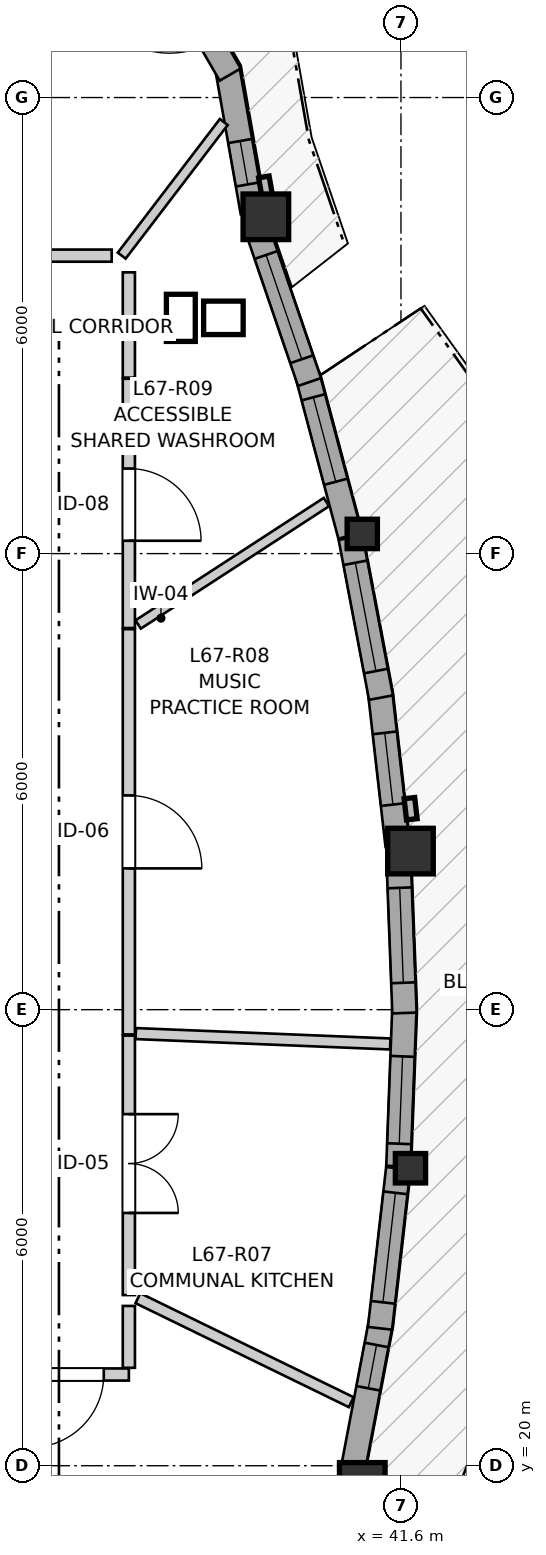
"""IFC4 building model, lengths in metres.
Left out: names, types, materials, properties, quantities, classifications, styles, units other than length and angle.
Written with IfcOpenShell. Run it as: python <this file> out.ifc"""

import sys

from ifc_helpers import new_model, si_unit, direction, frame, frame_2d, origin, origin_2d, place, context, subcontext, project, spatial, rectangle, i_section, extrude, source, transform, mapped, element, fill, save


model = new_model("IFC4")
c1 = context("Model", 3, precision=1e-05, world=origin(), true_north=direction((0.0, 1.0)))
c2 = subcontext(c1, "Body", "Model", "MODEL_VIEW")
j1 = project(units=[si_unit("LENGTHUNIT", "METRE"), si_unit("PLANEANGLEUNIT", "RADIAN")], contexts=[c1])
p1 = place(None, origin())
s1 = spatial("IfcSite", under=j1, at=p1, CompositionType="ELEMENT")
p2 = place(p1, origin())
s2 = spatial("IfcBuilding", under=s1, at=p2, CompositionType="ELEMENT")
p3 = place(p2, frame((0.0, 0.0, 224.4)))
s3 = spatial("IfcBuildingStorey", under=s2, at=p3, CompositionType="ELEMENT", Elevation=224.4)
m1 = source(origin(), c2, "Body", "SweptSolid", [
    extrude(rectangle(XDim=0.6, YDim=0.6, at=origin_2d()), origin(), (0.0, 0.0, 1.0), 2.96),
])
p4 = place(p3, frame((41.091, 19.741, 0.0), z_axis=(0.0, 0.0, 1.0), x_axis=(1.0, 0.0, 0.0)))
e1 = element("IfcColumn", 1, at=p4, inside=s3, PredefinedType="COLUMN", context=c2, shape_type="MappedRepresentation", body=[
    mapped(m1, transform((0.0, 0.0, 0.0), x_axis=(1.0, 0.0, 0.0), y_axis=(0.0, 1.0, 0.0), z_axis=(0.0, 0.0, 1.0), scale=1.0)),
])
m2 = source(origin(), c2, "Body", "SweptSolid", [
    extrude(i_section(OverallWidth=0.398, OverallDepth=0.387, WebThickness=0.019, FlangeThickness=0.03, FilletRadius=0.015, at=origin_2d()), origin(), (0.0, 0.0, 1.0), 2.96),
])
p5 = place(p3, frame((41.725, 23.914, 0.0), z_axis=(0.0, 0.0, 1.0), x_axis=(1.0, 0.0, 0.0)))
e2 = element("IfcColumn", 2, at=p5, inside=s3, PredefinedType="PILASTER", context=c2, shape_type="MappedRepresentation", body=[
    mapped(m2, transform((0.0, 0.0, 0.0), x_axis=(1.0, 0.0, 0.0), y_axis=(0.0, 1.0, 0.0), z_axis=(0.0, 0.0, 1.0), scale=1.0)),
])
p6 = place(p3, frame((41.725, 28.086, 0.0), z_axis=(0.0, 0.0, 1.0), x_axis=(1.0, 0.0, 0.0)))
e3 = element("IfcColumn", 3, at=p6, inside=s3, PredefinedType="COLUMN", context=c2, shape_type="MappedRepresentation", body=[
    mapped(m1, transform((0.0, 0.0, 0.0), x_axis=(1.0, 0.0, 0.0), y_axis=(0.0, 1.0, 0.0), z_axis=(0.0, 0.0, 1.0), scale=1.0)),
])
p7 = place(p3, frame((41.091, 32.259, 0.0), z_axis=(0.0, 0.0, 1.0), x_axis=(1.0, 0.0, 0.0)))
e4 = element("IfcColumn", 4, at=p7, inside=s3, PredefinedType="PILASTER", context=c2, shape_type="MappedRepresentation", body=[
    mapped(m2, transform((0.0, 0.0, 0.0), x_axis=(1.0, 0.0, 0.0), y_axis=(0.0, 1.0, 0.0), z_axis=(0.0, 0.0, 1.0), scale=1.0)),
])
p8 = place(p3, frame((39.823, 36.431, 0.0), z_axis=(0.0, 0.0, 1.0), x_axis=(1.0, 0.0, 0.0)))
e5 = element("IfcColumn", 5, at=p8, inside=s3, PredefinedType="COLUMN", context=c2, shape_type="MappedRepresentation", body=[
    mapped(m1, transform((0.0, 0.0, 0.0), x_axis=(1.0, 0.0, 0.0), y_axis=(0.0, 1.0, 0.0), z_axis=(0.0, 0.0, 1.0), scale=1.0)),
])
p9 = place(p3, frame((40.95, 19.86, 0.0), z_axis=(0.0, 0.0, 1.0), x_axis=(0.18667884524, 0.982420993638, 0.0)))
e6 = element("IfcWall", 6, at=p9, inside=s3, PredefinedType="SOLIDWALL", context=c2, shape_type="SweptSolid", body=[
    extrude(rectangle(XDim=2.072, YDim=0.32, at=frame_2d((1.036, 0.0))), origin(), (0.0, 0.0, 1.0), 2.58),
])
p10 = place(p9, frame((1.18, 0.0, 0.82)))
e7 = element("IfcOpeningElement", 7, at=p10, cuts=e6, PredefinedType="OPENING", context=c2, shape_type="SweptSolid", body=[
    extrude(rectangle(XDim=0.58, YDim=1.35, at=frame_2d((0.29, 0.675))), frame((0.0, 0.17, 0.0), z_axis=(0.0, -1.0, 0.0), x_axis=(1.0, 0.0, 0.0)), (0.0, 0.0, 1.0), 0.34),
])
p11 = place(p3, frame((41.324, 21.808, 0.0), z_axis=(0.0, 0.0, 1.0), x_axis=(0.113315758547, 0.993559026362, 0.0)))
e8 = element("IfcWall", 8, at=p11, inside=s3, PredefinedType="SOLIDWALL", context=c2, shape_type="SweptSolid", body=[
    extrude(rectangle(XDim=2.118, YDim=0.32, at=frame_2d((1.059, 0.0))), origin(), (0.0, 0.0, 1.0), 2.58),
])
p12 = place(p11, frame((0.344, 0.0, 0.82)))
e9 = element("IfcOpeningElement", 9, at=p12, cuts=e8, PredefinedType="OPENING", context=c2, shape_type="SweptSolid", body=[
    extrude(rectangle(XDim=1.45, YDim=1.25, at=frame_2d((0.725, 0.625))), frame((0.0, 0.17, 0.0), z_axis=(0.0, -1.0, 0.0), x_axis=(1.0, 0.0, 0.0)), (0.0, 0.0, 1.0), 0.34),
])
p13 = place(p3, frame((41.566, 23.94, 0.0), z_axis=(0.0, 0.0, 1.0), x_axis=(0.037912160544, 0.999281075615, 0.0)))
e10 = element("IfcWall", 10, at=p13, inside=s3, PredefinedType="SOLIDWALL", context=c2, shape_type="SweptSolid", body=[
    extrude(rectangle(XDim=2.106, YDim=0.32, at=frame_2d((1.053, 0.0))), origin(), (0.0, 0.0, 1.0), 2.58),
])
p14 = place(p13, frame((0.297, 0.0, 0.82)))
e11 = element("IfcOpeningElement", 11, at=p14, cuts=e10, PredefinedType="OPENING", context=c2, shape_type="SweptSolid", body=[
    extrude(rectangle(XDim=1.15, YDim=1.2, at=frame_2d((0.575, 0.6))), frame((0.0, 0.17, 0.0), z_axis=(0.0, -1.0, 0.0), x_axis=(1.0, 0.0, 0.0)), (0.0, 0.0, 1.0), 0.34),
])
p15 = place(p3, frame((41.646, 25.956, 0.0), z_axis=(0.0, 0.0, 1.0), x_axis=(-0.038018581285, 0.999277032397, 0.0)))
e12 = element("IfcWall", 12, at=p15, inside=s3, PredefinedType="SOLIDWALL", context=c2, shape_type="SweptSolid", body=[
    extrude(rectangle(XDim=2.036, YDim=0.32, at=frame_2d((1.018, 0.0))), origin(), (0.0, 0.0, 1.0), 2.58),
])
p16 = place(p15, frame((0.398, 0.0, 0.82)))
e13 = element("IfcOpeningElement", 13, at=p16, cuts=e12, PredefinedType="OPENING", context=c2, shape_type="SweptSolid", body=[
    extrude(rectangle(XDim=1.25, YDim=1.35, at=frame_2d((0.625, 0.675))), frame((0.0, 0.17, 0.0), z_axis=(0.0, -1.0, 0.0), x_axis=(1.0, 0.0, 0.0)), (0.0, 0.0, 1.0), 0.34),
])
p17 = place(p3, frame((41.556, 28.158, 0.0), z_axis=(0.0, 0.0, 1.0), x_axis=(-0.113270843693, 0.993564147888, 0.0)))
e14 = element("IfcWall", 14, at=p17, inside=s3, PredefinedType="SOLIDWALL", context=c2, shape_type="SweptSolid", body=[
    extrude(rectangle(XDim=2.048, YDim=0.32, at=frame_2d((1.024, 0.0))), origin(), (0.0, 0.0, 1.0), 2.58),
])
p18 = place(p17, frame((0.544, 0.0, 0.82)))
e15 = element("IfcOpeningElement", 15, at=p18, cuts=e14, PredefinedType="OPENING", context=c2, shape_type="SweptSolid", body=[
    extrude(rectangle(XDim=0.95, YDim=1.35, at=frame_2d((0.475, 0.675))), frame((0.0, 0.17, 0.0), z_axis=(0.0, -1.0, 0.0), x_axis=(1.0, 0.0, 0.0)), (0.0, 0.0, 1.0), 0.34),
])
p19 = place(p3, frame((41.337, 30.105, 0.0), z_axis=(0.0, 0.0, 1.0), x_axis=(-0.186614434744, 0.98243323068, 0.0)))
e16 = element("IfcWall", 16, at=p19, inside=s3, PredefinedType="SOLIDWALL", context=c2, shape_type="SweptSolid", body=[
    extrude(rectangle(XDim=2.142, YDim=0.32, at=frame_2d((1.071, 0.0))), origin(), (0.0, 0.0, 1.0), 2.58),
])
p20 = place(p19, frame((0.356, 0.0, 0.82)))
e17 = element("IfcOpeningElement", 17, at=p20, cuts=e16, PredefinedType="OPENING", context=c2, shape_type="SweptSolid", body=[
    extrude(rectangle(XDim=1.45, YDim=1.25, at=frame_2d((0.725, 0.625))), frame((0.0, 0.17, 0.0), z_axis=(0.0, -1.0, 0.0), x_axis=(1.0, 0.0, 0.0)), (0.0, 0.0, 1.0), 0.34),
])
p21 = place(p3, frame((40.931, 32.237, 0.0), z_axis=(0.0, 0.0, 1.0), x_axis=(-0.257076193941, 0.966391137433, 0.0)))
e18 = element("IfcWall", 18, at=p21, inside=s3, PredefinedType="SOLIDWALL", context=c2, shape_type="SweptSolid", body=[
    extrude(rectangle(XDim=2.177, YDim=0.32, at=frame_2d((1.088, 0.0))), origin(), (0.0, 0.0, 1.0), 2.58),
])
p22 = place(p21, frame((0.733, 0.0, 0.82)))
e19 = element("IfcOpeningElement", 19, at=p22, cuts=e18, PredefinedType="OPENING", context=c2, shape_type="SweptSolid", body=[
    extrude(rectangle(XDim=1.15, YDim=1.2, at=frame_2d((0.575, 0.6))), frame((0.0, 0.17, 0.0), z_axis=(0.0, -1.0, 0.0), x_axis=(1.0, 0.0, 0.0)), (0.0, 0.0, 1.0), 0.34),
])
p23 = place(p3, frame((40.397, 34.257, 0.0), z_axis=(0.0, 0.0, 1.0), x_axis=(-0.323634249216, 0.9461822619, 0.0)))
e20 = element("IfcWall", 20, at=p23, inside=s3, PredefinedType="SOLIDWALL", context=c2, shape_type="SweptSolid", body=[
    extrude(rectangle(XDim=2.153, YDim=0.32, at=frame_2d((1.077, 0.0))), origin(), (0.0, 0.0, 1.0), 2.58),
])
p24 = place(p23, frame((0.316, 0.0, 0.82)))
e21 = element("IfcOpeningElement", 21, at=p24, cuts=e20, PredefinedType="OPENING", context=c2, shape_type="SweptSolid", body=[
    extrude(rectangle(XDim=1.45, YDim=1.25, at=frame_2d((0.725, 0.625))), frame((0.0, 0.17, 0.0), z_axis=(0.0, -1.0, 0.0), x_axis=(1.0, 0.0, 0.0)), (0.0, 0.0, 1.0), 0.34),
])
p25 = place(p3, frame((39.649, 36.492, 0.0), z_axis=(0.0, 0.0, 1.0), x_axis=(-0.173693060482, 0.984799837906, 0.0)))
e22 = element("IfcWall", 22, at=p25, inside=s3, PredefinedType="SOLIDWALL", context=c2, shape_type="SweptSolid", body=[
    extrude(rectangle(XDim=1.962, YDim=0.32, at=frame_2d((0.981, 0.0))), origin(), (0.0, 0.0, 1.0), 2.58),
])
p26 = place(p25, frame((0.371, 0.0, 0.82)))
e23 = element("IfcOpeningElement", 23, at=p26, cuts=e22, PredefinedType="OPENING", context=c2, shape_type="SweptSolid", body=[
    extrude(rectangle(XDim=0.58, YDim=1.35, at=frame_2d((0.29, 0.675))), frame((0.0, 0.17, 0.0), z_axis=(0.0, -1.0, 0.0), x_axis=(1.0, 0.0, 0.0)), (0.0, 0.0, 1.0), 0.34),
])
p27 = place(p3, frame((39.353, 38.302, 0.0), z_axis=(0.0, 0.0, 1.0), x_axis=(-0.49990781971, 0.866078617559, 0.0)))
e24 = element("IfcWall", 24, at=p27, inside=s3, PredefinedType="SOLIDWALL", context=c2, shape_type="SweptSolid", body=[
    extrude(rectangle(XDim=2.09, YDim=0.32, at=frame_2d((1.045, 0.0))), origin(), (0.0, 0.0, 1.0), 2.58),
])
p28 = place(p27, frame((0.495, 0.0, 0.0)))
e25 = element("IfcOpeningElement", 25, at=p28, cuts=e24, PredefinedType="OPENING", context=c2, shape_type="SweptSolid", body=[
    extrude(rectangle(XDim=1.1, YDim=2.1, at=frame_2d((0.55, 1.05))), frame((0.0, 0.17, 0.0), z_axis=(0.0, -1.0, 0.0), x_axis=(1.0, 0.0, 0.0)), (0.0, 0.0, 1.0), 0.34),
])
p29 = place(p3, frame((38.02, 31.006, 0.0), z_axis=(0.0, 0.0, 1.0), x_axis=(0.0, -1.0, 0.0)))
e26 = element("IfcWall", 26, at=p29, inside=s3, PredefinedType="PARTITIONING", context=c2, shape_type="SweptSolid", body=[
    extrude(rectangle(XDim=5.332, YDim=0.16, at=frame_2d((2.666, 0.0))), origin(), (0.0, 0.0, 1.0), 2.628),
])
p30 = place(p29, frame((2.188, 0.0, 0.0)))
e27 = element("IfcOpeningElement", 27, at=p30, cuts=e26, PredefinedType="OPENING", context=c2, shape_type="SweptSolid", body=[
    extrude(rectangle(XDim=0.96, YDim=2.1, at=frame_2d((0.48, 1.05))), frame((0.0, 0.09, 0.0), z_axis=(0.0, -1.0, 0.0), x_axis=(1.0, 0.0, 0.0)), (0.0, 0.0, 1.0), 0.18),
])
p31 = place(p3, frame((38.02, 25.659, 0.0), z_axis=(0.0, 0.0, 1.0), x_axis=(0.0, -1.0, 0.0)))
e28 = element("IfcWall", 28, at=p31, inside=s3, PredefinedType="PARTITIONING", context=c2, shape_type="SweptSolid", body=[
    extrude(rectangle(XDim=3.414, YDim=0.16, at=frame_2d((1.707, 0.0))), origin(), (0.0, 0.0, 1.0), 2.628),
])
p32 = place(p31, frame((1.033, 0.0, 0.0)))
e29 = element("IfcOpeningElement", 29, at=p32, cuts=e28, PredefinedType="OPENING", context=c2, shape_type="SweptSolid", body=[
    extrude(rectangle(XDim=1.3, YDim=2.1, at=frame_2d((0.65, 1.05))), frame((0.0, 0.09, 0.0), z_axis=(0.0, -1.0, 0.0), x_axis=(1.0, 0.0, 0.0)), (0.0, 0.0, 1.0), 0.18),
])
p33 = place(p3, frame((38.02, 34.3, 0.0), z_axis=(0.0, 0.0, 1.0), x_axis=(0.0, -1.0, 0.0)))
e30 = element("IfcWall", 30, at=p33, inside=s3, PredefinedType="PARTITIONING", context=c2, shape_type="SweptSolid", body=[
    extrude(rectangle(XDim=3.279, YDim=0.16, at=frame_2d((1.64, 0.0))), origin(), (0.0, 0.0, 1.0), 2.628),
])
p34 = place(p33, frame((1.181, 0.0, 0.0)))
e31 = element("IfcOpeningElement", 31, at=p34, cuts=e30, PredefinedType="OPENING", context=c2, shape_type="SweptSolid", body=[
    extrude(rectangle(XDim=0.95, YDim=2.1, at=frame_2d((0.475, 1.05))), frame((0.0, 0.09, 0.0), z_axis=(0.0, -1.0, 0.0), x_axis=(1.0, 0.0, 0.0)), (0.0, 0.0, 1.0), 0.18),
])
p35 = place(p3, frame((38.02, 21.2, 0.0), z_axis=(0.0, 0.0, 1.0), x_axis=(-1.0, 0.0, 0.0)))
e32 = element("IfcWall", 32, at=p35, inside=s3, PredefinedType="PARTITIONING", context=c2, shape_type="SweptSolid", body=[
    extrude(rectangle(XDim=1.612, YDim=0.16, at=frame_2d((0.806, 0.0))), origin(), (0.0, 0.0, 1.0), 2.96),
])
p36 = place(p35, frame((0.33, 0.0, 0.0)))
e33 = element("IfcOpeningElement", 33, at=p36, cuts=e32, PredefinedType="OPENING", context=c2, shape_type="SweptSolid", body=[
    extrude(rectangle(XDim=0.96, YDim=2.1, at=frame_2d((0.48, 1.05))), frame((0.0, 0.09, 0.0), z_axis=(0.0, -1.0, 0.0), x_axis=(1.0, 0.0, 0.0)), (0.0, 0.0, 1.0), 0.18),
])
p37 = place(p3, frame((38.111, 25.685, 0.0), z_axis=(0.0, 0.0, 1.0), x_axis=(0.999167325882, -0.040800182477, 0.0)))
e34 = element("IfcWall", 34, at=p37, inside=s3, PredefinedType="PARTITIONING", context=c2, shape_type="SweptSolid", body=[
    extrude(rectangle(XDim=3.351, YDim=0.145, at=frame_2d((1.675, 0.0))), origin(), (0.0, 0.0, 1.0), 2.96),
])
p38 = place(p3, frame((38.139, 22.204, 0.0), z_axis=(0.0, 0.0, 1.0), x_axis=(0.898869860356, -0.43821567081, 0.0)))
e35 = element("IfcWall", 35, at=p38, inside=s3, PredefinedType="PARTITIONING", context=c2, shape_type="SweptSolid", body=[
    extrude(rectangle(XDim=3.123, YDim=0.145, at=frame_2d((1.562, 0.0))), origin(), (0.0, 0.0, 1.0), 2.96),
])
p39 = place(p3, frame((38.142, 31.067, 0.0), z_axis=(0.0, 0.0, 1.0), x_axis=(0.838351109823, 0.545130641827, 0.0)))
e36 = element("IfcWall", 36, at=p39, inside=s3, PredefinedType="PARTITIONING", context=c2, shape_type="SweptSolid", body=[
    extrude(rectangle(XDim=2.955, YDim=0.13, at=frame_2d((1.478, 0.0))), origin(), (0.0, 0.0, 1.0), 2.96),
])
p40 = place(p3, frame((37.926, 35.92, 0.0), z_axis=(0.0, 0.0, 1.0), x_axis=(0.606987113509, 0.794711673523, 0.0)))
e37 = element("IfcWall", 37, at=p40, inside=s3, PredefinedType="PARTITIONING", context=c2, shape_type="SweptSolid", body=[
    extrude(rectangle(XDim=2.212, YDim=0.13, at=frame_2d((1.106, 0.0))), origin(), (0.0, 0.0, 1.0), 2.96),
])
p41 = place(p3, frame((38.02, 34.315, 0.0), z_axis=(0.0, 0.0, 1.0), x_axis=(0.0, 1.0, 0.0)))
e38 = element("IfcWall", 38, at=p41, inside=s3, PredefinedType="PARTITIONING", context=c2, shape_type="SweptSolid", body=[
    extrude(rectangle(XDim=1.385, YDim=0.16, at=frame_2d((0.693, 0.0))), origin(), (0.0, 0.0, 1.0), 2.96),
])
p42 = place(p3, frame((36.415, 35.92, 0.0), z_axis=(0.0, 0.0, 1.0), x_axis=(1.0, 0.0, 0.0)))
e39 = element("IfcWall", 39, at=p42, inside=s3, PredefinedType="PARTITIONING", context=c2, shape_type="SweptSolid", body=[
    extrude(rectangle(XDim=1.379, YDim=0.16, at=frame_2d((0.689, 0.0))), origin(), (0.0, 0.0, 1.0), 2.598),
])
p43 = place(p3, frame((38.02, 21.288, 0.0), z_axis=(0.0, 0.0, 1.0), x_axis=(0.0, 1.0, 0.0)))
e40 = element("IfcWall", 40, at=p43, inside=s3, PredefinedType="PARTITIONING", context=c2, shape_type="SweptSolid", body=[
    extrude(rectangle(XDim=0.814, YDim=0.16, at=frame_2d((0.407, 0.0))), origin(), (0.0, 0.0, 1.0), 2.628),
])
m3 = source(origin(), c2, "Body", "SweptSolid", [
    extrude(rectangle(XDim=0.58, YDim=1.35, at=frame_2d((0.29, 0.675))), frame((0.0, 0.03, 0.0), z_axis=(0.0, -1.0, 0.0), x_axis=(1.0, 0.0, 0.0)), (0.0, 0.0, 1.0), 0.06),
])
p44 = place(p10, origin())
e41 = element("IfcWindow", 41, at=p44, inside=s3, PartitioningType="SINGLE_PANEL", PredefinedType="WINDOW", context=c2, shape_type="MappedRepresentation", body=[
    mapped(m3, transform((0.0, 0.0, 0.0), x_axis=(1.0, 0.0, 0.0), y_axis=(0.0, 1.0, 0.0), z_axis=(0.0, 0.0, 1.0), scale=1.0)),
])
fill(e7, e41)
m4 = source(origin(), c2, "Body", "SweptSolid", [
    extrude(rectangle(XDim=1.45, YDim=1.25, at=frame_2d((0.725, 0.625))), frame((0.0, 0.03, 0.0), z_axis=(0.0, -1.0, 0.0), x_axis=(1.0, 0.0, 0.0)), (0.0, 0.0, 1.0), 0.06),
])
p45 = place(p12, origin())
e42 = element("IfcWindow", 42, at=p45, inside=s3, PartitioningType="SINGLE_PANEL", PredefinedType="WINDOW", context=c2, shape_type="MappedRepresentation", body=[
    mapped(m4, transform((0.0, 0.0, 0.0), x_axis=(1.0, 0.0, 0.0), y_axis=(0.0, 1.0, 0.0), z_axis=(0.0, 0.0, 1.0), scale=1.0)),
])
fill(e9, e42)
m5 = source(origin(), c2, "Body", "SweptSolid", [
    extrude(rectangle(XDim=1.15, YDim=1.2, at=frame_2d((0.575, 0.6))), frame((0.0, 0.03, 0.0), z_axis=(0.0, -1.0, 0.0), x_axis=(1.0, 0.0, 0.0)), (0.0, 0.0, 1.0), 0.06),
])
p46 = place(p14, origin())
e43 = element("IfcWindow", 43, at=p46, inside=s3, PartitioningType="SINGLE_PANEL", PredefinedType="WINDOW", context=c2, shape_type="MappedRepresentation", body=[
    mapped(m5, transform((0.0, 0.0, 0.0), x_axis=(1.0, 0.0, 0.0), y_axis=(0.0, 1.0, 0.0), z_axis=(0.0, 0.0, 1.0), scale=1.0)),
])
fill(e11, e43)
m6 = source(origin(), c2, "Body", "SweptSolid", [
    extrude(rectangle(XDim=1.25, YDim=1.35, at=frame_2d((0.625, 0.675))), frame((0.0, 0.03, 0.0), z_axis=(0.0, -1.0, 0.0), x_axis=(1.0, 0.0, 0.0)), (0.0, 0.0, 1.0), 0.06),
])
p47 = place(p16, origin())
e44 = element("IfcWindow", 44, at=p47, inside=s3, PartitioningType="SINGLE_PANEL", PredefinedType="WINDOW", context=c2, shape_type="MappedRepresentation", body=[
    mapped(m6, transform((0.0, 0.0, 0.0), x_axis=(1.0, 0.0, 0.0), y_axis=(0.0, 1.0, 0.0), z_axis=(0.0, 0.0, 1.0), scale=1.0)),
])
fill(e13, e44)
m7 = source(origin(), c2, "Body", "SweptSolid", [
    extrude(rectangle(XDim=0.95, YDim=1.35, at=frame_2d((0.475, 0.675))), frame((0.0, 0.03, 0.0), z_axis=(0.0, -1.0, 0.0), x_axis=(1.0, 0.0, 0.0)), (0.0, 0.0, 1.0), 0.06),
])
p48 = place(p18, origin())
e45 = element("IfcWindow", 45, at=p48, inside=s3, PartitioningType="SINGLE_PANEL", PredefinedType="WINDOW", context=c2, shape_type="MappedRepresentation", body=[
    mapped(m7, transform((0.0, 0.0, 0.0), x_axis=(1.0, 0.0, 0.0), y_axis=(0.0, 1.0, 0.0), z_axis=(0.0, 0.0, 1.0), scale=1.0)),
])
fill(e15, e45)
p49 = place(p20, origin())
e46 = element("IfcWindow", 46, at=p49, inside=s3, PartitioningType="SINGLE_PANEL", PredefinedType="WINDOW", context=c2, shape_type="MappedRepresentation", body=[
    mapped(m4, transform((0.0, 0.0, 0.0), x_axis=(1.0, 0.0, 0.0), y_axis=(0.0, 1.0, 0.0), z_axis=(0.0, 0.0, 1.0), scale=1.0)),
])
fill(e17, e46)
p50 = place(p22, origin())
e47 = element("IfcWindow", 47, at=p50, inside=s3, PartitioningType="SINGLE_PANEL", PredefinedType="WINDOW", context=c2, shape_type="MappedRepresentation", body=[
    mapped(m5, transform((0.0, 0.0, 0.0), x_axis=(1.0, 0.0, 0.0), y_axis=(0.0, 1.0, 0.0), z_axis=(0.0, 0.0, 1.0), scale=1.0)),
])
fill(e19, e47)
p51 = place(p24, origin())
e48 = element("IfcWindow", 48, at=p51, inside=s3, PartitioningType="SINGLE_PANEL", PredefinedType="WINDOW", context=c2, shape_type="MappedRepresentation", body=[
    mapped(m4, transform((0.0, 0.0, 0.0), x_axis=(1.0, 0.0, 0.0), y_axis=(0.0, 1.0, 0.0), z_axis=(0.0, 0.0, 1.0), scale=1.0)),
])
fill(e21, e48)
p52 = place(p26, origin())
e49 = element("IfcWindow", 49, at=p52, inside=s3, PartitioningType="SINGLE_PANEL", PredefinedType="WINDOW", context=c2, shape_type="MappedRepresentation", body=[
    mapped(m3, transform((0.0, 0.0, 0.0), x_axis=(1.0, 0.0, 0.0), y_axis=(0.0, 1.0, 0.0), z_axis=(0.0, 0.0, 1.0), scale=1.0)),
])
fill(e23, e49)
m8 = source(origin(), c2, "Body", "SweptSolid", [
    extrude(rectangle(XDim=0.96, YDim=2.1, at=frame_2d((0.48, 1.05))), frame((0.0, 0.025, 0.0), z_axis=(0.0, -1.0, 0.0), x_axis=(1.0, 0.0, 0.0)), (0.0, 0.0, 1.0), 0.05),
])
p53 = place(p30, origin())
e50 = element("IfcDoor", 50, at=p53, inside=s3, OperationType="SINGLE_SWING_RIGHT", PredefinedType="DOOR", context=c2, shape_type="MappedRepresentation", body=[
    mapped(m8, transform((0.0, 0.0, 0.0), x_axis=(1.0, 0.0, 0.0), y_axis=(0.0, 1.0, 0.0), z_axis=(0.0, 0.0, 1.0), scale=1.0)),
])
fill(e27, e50)
m9 = source(origin(), c2, "Body", "SweptSolid", [
    extrude(rectangle(XDim=1.3, YDim=2.1, at=frame_2d((0.65, 1.05))), frame((0.0, 0.025, 0.0), z_axis=(0.0, -1.0, 0.0), x_axis=(1.0, 0.0, 0.0)), (0.0, 0.0, 1.0), 0.05),
])
p54 = place(p32, origin())
e51 = element("IfcDoor", 51, at=p54, inside=s3, OperationType="DOUBLE_DOOR_SINGLE_SWING", PredefinedType="DOOR", context=c2, shape_type="MappedRepresentation", body=[
    mapped(m9, transform((0.0, 0.0, 0.0), x_axis=(1.0, 0.0, 0.0), y_axis=(0.0, 1.0, 0.0), z_axis=(0.0, 0.0, 1.0), scale=1.0)),
])
fill(e29, e51)
m10 = source(origin(), c2, "Body", "SweptSolid", [
    extrude(rectangle(XDim=0.95, YDim=2.1, at=frame_2d((0.475, 1.05))), frame((0.0, 0.025, 0.0), z_axis=(0.0, -1.0, 0.0), x_axis=(1.0, 0.0, 0.0)), (0.0, 0.0, 1.0), 0.05),
])
p55 = place(p34, origin())
e52 = element("IfcDoor", 52, at=p55, inside=s3, OperationType="SINGLE_SWING_RIGHT", PredefinedType="DOOR", context=c2, shape_type="MappedRepresentation", body=[
    mapped(m10, transform((0.0, 0.0, 0.0), x_axis=(1.0, 0.0, 0.0), y_axis=(0.0, 1.0, 0.0), z_axis=(0.0, 0.0, 1.0), scale=1.0)),
])
fill(e31, e52)
p56 = place(p36, origin())
e53 = element("IfcDoor", 53, at=p56, inside=s3, OperationType="SINGLE_SWING_RIGHT", PredefinedType="DOOR", context=c2, shape_type="MappedRepresentation", body=[
    mapped(m8, transform((0.0, 0.0, 0.0), x_axis=(1.0, 0.0, 0.0), y_axis=(0.0, 1.0, 0.0), z_axis=(0.0, 0.0, 1.0), scale=1.0)),
])
fill(e33, e53)
save(model, sys.argv[1])
